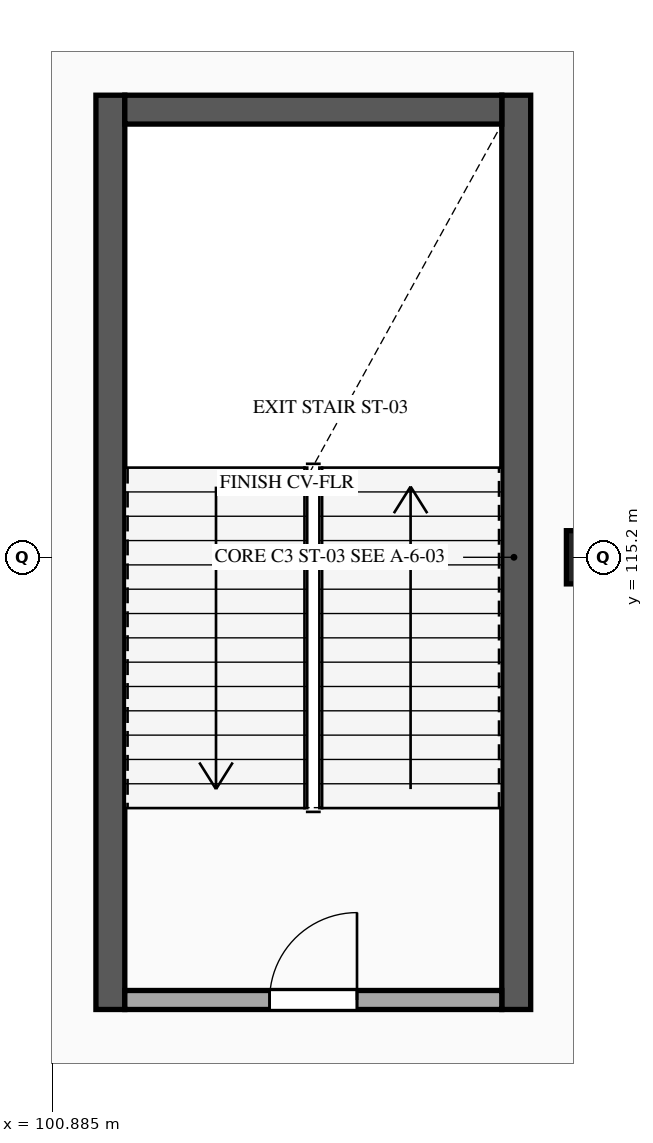
"""IFC4 building model, lengths in metres.
Left out: names, types, materials, properties, quantities, classifications, styles, units other than length and angle.
Written with IfcOpenShell. Run it as: python <this file> out.ifc"""

import sys

from ifc_helpers import new_model, si_unit, direction, frame, frame_2d, origin, origin_2d, place, context, subcontext, project, spatial, rectangle, extrude, element, fill, save


model = new_model("IFC4")
c1 = context("Model", 3, precision=1e-05, world=origin(), true_north=direction((0.0, 1.0)))
c2 = subcontext(c1, "Body", "Model", "MODEL_VIEW")
j1 = project(units=[si_unit("LENGTHUNIT", "METRE"), si_unit("PLANEANGLEUNIT", "RADIAN")], contexts=[c1])
p1 = place(None, origin())
s1 = spatial("IfcSite", under=j1, at=p1, CompositionType="ELEMENT")
p2 = place(p1, origin())
s2 = spatial("IfcBuilding", under=s1, at=p2, CompositionType="ELEMENT")
p3 = place(p2, frame((0.0, 0.0, 10.8)))
s3 = spatial("IfcBuildingStorey", under=s2, at=p3, CompositionType="ELEMENT", Elevation=10.8)
p4 = place(p3, frame((108.0, 115.2, 0.0), z_axis=(0.0, 0.0, 1.0), x_axis=(1.0, 0.0, 0.0)))
e1 = element("IfcColumn", 1, at=p4, inside=s3, PredefinedType="COLUMN", context=c2, shape_type="SweptSolid", body=[
    extrude(rectangle(XDim=0.7, YDim=0.7, at=origin_2d()), origin(), (0.0, 0.0, 1.0), 4.5),
])
for number, where, z_axis, x_axis in (
    (2, (101.65, 109.25, 0.0), (0.0, 0.0, 1.0), (0.0, 1.0, 0.0)),
    (3, (106.99, 121.28, 0.0), (0.0, 0.0, 1.0), (0.0, -1.0, 0.0)),
):
    element("IfcWall", number, at=place(p3, frame(where, z_axis=z_axis, x_axis=x_axis)), inside=s3, PredefinedType="SHEAR", context=c2, shape_type="SweptSolid", body=[
        extrude(rectangle(XDim=12.03, YDim=0.38, at=frame_2d((6.015, 0.0))), origin(), (0.0, 0.0, 1.0), 4.25),
    ])
p5 = place(p3, frame((101.84, 121.09, 0.0), z_axis=(0.0, 0.0, 1.0), x_axis=(1.0, 0.0, 0.0)))
e4 = element("IfcWall", 4, at=p5, inside=s3, PredefinedType="SHEAR", context=c2, shape_type="SweptSolid", body=[
    extrude(rectangle(XDim=4.96, YDim=0.38, at=frame_2d((2.48, 0.0))), origin(), (0.0, 0.0, 1.0), 4.25),
])
p6 = place(p3, frame((101.84, 109.375, 0.0), z_axis=(0.0, 0.0, 1.0), x_axis=(1.0, 0.0, 0.0)))
e5 = element("IfcWall", 5, at=p6, inside=s3, PredefinedType="STANDARD", context=c2, shape_type="SweptSolid", body=[
    extrude(rectangle(XDim=4.96, YDim=0.25, at=frame_2d((2.48, 0.0))), origin(), (0.0, 0.0, 1.0), 4.22),
])
p7 = place(p6, frame((1.905, 0.0, 0.0)))
e6 = element("IfcOpeningElement", 6, at=p7, cuts=e5, PredefinedType="OPENING", context=c2, shape_type="SweptSolid", body=[
    extrude(rectangle(XDim=1.15, YDim=2.2, at=frame_2d((0.575, 1.1))), frame((0.0, 0.135, 0.0), z_axis=(0.0, -1.0, 0.0), x_axis=(1.0, 0.0, 0.0)), (0.0, 0.0, 1.0), 0.27),
])
p8 = place(p7, origin())
e7 = element("IfcDoor", 7, at=p8, inside=s3, OperationType="SINGLE_SWING_RIGHT", PredefinedType="DOOR", context=c2, shape_type="SweptSolid", body=[
    extrude(rectangle(XDim=1.15, YDim=2.2, at=frame_2d((0.575, 1.1))), frame((0.0, 0.025, 0.0), z_axis=(0.0, -1.0, 0.0), x_axis=(1.0, 0.0, 0.0)), (0.0, 0.0, 1.0), 0.05),
])
fill(e6, e7)
save(model, sys.argv[1])
